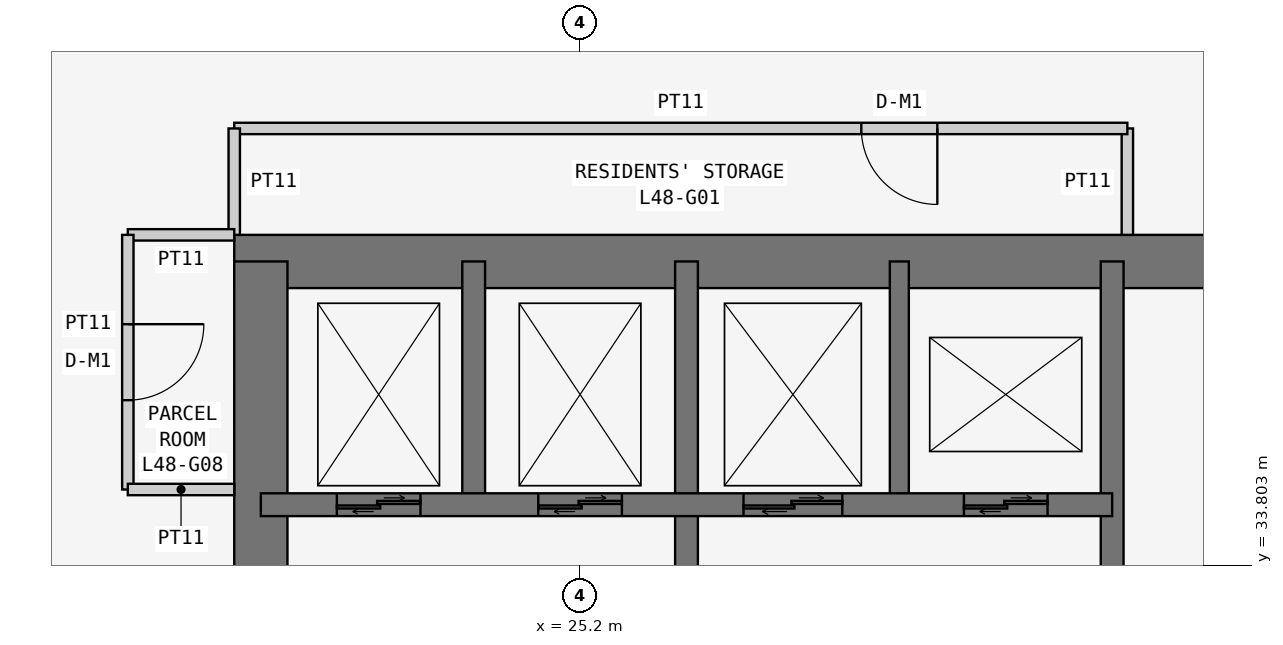
"""IFC4 building model, lengths in metres.
Left out: names, types, materials, properties, quantities, classifications, styles, units other than length and angle.
Written with IfcOpenShell. Run it as: python <this file> out.ifc"""

import sys

from ifc_helpers import new_model, si_unit, direction, frame, frame_2d, origin, place, context, subcontext, project, spatial, rectangle, extrude, element, fill, save


model = new_model("IFC4")
c1 = context("Model", 3, precision=1e-05, world=origin(), true_north=direction((0.0, 1.0)))
c2 = subcontext(c1, "Body", "Model", "MODEL_VIEW")
j1 = project(units=[si_unit("LENGTHUNIT", "METRE"), si_unit("PLANEANGLEUNIT", "RADIAN")], contexts=[c1])
p1 = place(None, origin())
s1 = spatial("IfcSite", under=j1, at=p1, CompositionType="ELEMENT")
p2 = place(p1, origin())
s2 = spatial("IfcBuilding", under=s1, at=p2, CompositionType="ELEMENT")
p3 = place(p2, frame((0.0, 0.0, 186.9)))
s3 = spatial("IfcBuildingStorey", under=s2, at=p3, CompositionType="ELEMENT", Elevation=186.9)
p4 = place(p3, frame((37.8, 37.8, 0.0), z_axis=(0.0, 0.0, 1.0), x_axis=(-1.0, 0.0, 0.0)))
e1 = element("IfcWall", 1, at=p4, inside=s3, PredefinedType="SHEAR", context=c2, shape_type="SweptSolid", body=[
    extrude(rectangle(XDim=17.15, YDim=0.7, at=frame_2d((8.575, 0.0))), origin(), (0.0, 0.0, 1.0), 3.6),
])
p5 = place(p3, frame((21.0, 37.8, 0.0), z_axis=(0.0, 0.0, 1.0), x_axis=(0.0, -1.0, 0.0)))
e2 = element("IfcWall", 2, at=p5, inside=s3, PredefinedType="SHEAR", context=c2, shape_type="SweptSolid", body=[
    extrude(rectangle(XDim=17.15, YDim=0.7, at=frame_2d((8.575, 0.0))), origin(), (0.0, 0.0, 1.0), 3.6),
])
p6 = place(p5, frame((5.4, 0.0, 0.0)))
e3 = element("IfcOpeningElement", 3, at=p6, cuts=e2, PredefinedType="OPENING", context=c2, shape_type="SweptSolid", body=[
    extrude(rectangle(XDim=1.2, YDim=2.1, at=frame_2d((0.6, 1.05))), frame((0.0, 0.36, 0.0), z_axis=(0.0, -1.0, 0.0), x_axis=(1.0, 0.0, 0.0)), (0.0, 0.0, 1.0), 0.72),
])
p7 = place(p3, frame((26.6, 21.0, 0.0), z_axis=(0.0, 0.0, 1.0), x_axis=(0.0, 1.0, 0.0)))
e4 = element("IfcWall", 4, at=p7, inside=s3, PredefinedType="SHEAR", context=c2, shape_type="SweptSolid", body=[
    extrude(rectangle(XDim=16.8, YDim=0.3, at=frame_2d((8.4, 0.0))), origin(), (0.0, 0.0, 1.0), 3.6),
])
p8 = place(p7, frame((10.4, 0.0, 0.0)))
e5 = element("IfcOpeningElement", 5, at=p8, cuts=e4, PredefinedType="OPENING", context=c2, shape_type="SweptSolid", body=[
    extrude(rectangle(XDim=1.2, YDim=2.1, at=frame_2d((0.6, 1.05))), frame((0.0, 0.16, 0.0), z_axis=(0.0, -1.0, 0.0), x_axis=(1.0, 0.0, 0.0)), (0.0, 0.0, 1.0), 0.32),
])
p9 = place(p3, frame((21.0, 34.6, 0.0), z_axis=(0.0, 0.0, 1.0), x_axis=(1.0, 0.0, 0.0)))
e6 = element("IfcWall", 6, at=p9, inside=s3, PredefinedType="SHEAR", context=c2, shape_type="SweptSolid", body=[
    extrude(rectangle(XDim=11.2, YDim=0.3, at=frame_2d((5.6, 0.0))), origin(), (0.0, 0.0, 1.0), 3.6),
])
p10 = place(p9, frame((9.25, 0.0, 0.0)))
e7 = element("IfcOpeningElement", 7, at=p10, cuts=e6, PredefinedType="OPENING", context=c2, shape_type="SweptSolid", body=[
    extrude(rectangle(XDim=1.1, YDim=2.1, at=frame_2d((0.55, 1.05))), frame((0.0, 0.16, 0.0), z_axis=(0.0, -1.0, 0.0), x_axis=(1.0, 0.0, 0.0)), (0.0, 0.0, 1.0), 0.32),
])
p11 = place(p9, frame((1.0, 0.0, 0.0)))
e8 = element("IfcOpeningElement", 8, at=p11, cuts=e6, PredefinedType="OPENING", context=c2, shape_type="SweptSolid", body=[
    extrude(rectangle(XDim=1.1, YDim=2.1, at=frame_2d((0.55, 1.05))), frame((0.0, 0.16, 0.0), z_axis=(0.0, -1.0, 0.0), x_axis=(1.0, 0.0, 0.0)), (0.0, 0.0, 1.0), 0.32),
])
p12 = place(p9, frame((3.65, 0.0, 0.0)))
e9 = element("IfcOpeningElement", 9, at=p12, cuts=e6, PredefinedType="OPENING", context=c2, shape_type="SweptSolid", body=[
    extrude(rectangle(XDim=1.1, YDim=2.1, at=frame_2d((0.55, 1.05))), frame((0.0, 0.16, 0.0), z_axis=(0.0, -1.0, 0.0), x_axis=(1.0, 0.0, 0.0)), (0.0, 0.0, 1.0), 0.32),
])
p13 = place(p9, frame((6.35, 0.0, 0.0)))
e10 = element("IfcOpeningElement", 10, at=p13, cuts=e6, PredefinedType="OPENING", context=c2, shape_type="SweptSolid", body=[
    extrude(rectangle(XDim=1.3, YDim=2.1, at=frame_2d((0.65, 1.05))), frame((0.0, 0.16, 0.0), z_axis=(0.0, -1.0, 0.0), x_axis=(1.0, 0.0, 0.0)), (0.0, 0.0, 1.0), 0.32),
])
p14 = place(p3, frame((23.8, 34.6, 0.0), z_axis=(0.0, 0.0, 1.0), x_axis=(0.0, 1.0, 0.0)))
e11 = element("IfcWall", 11, at=p14, inside=s3, PredefinedType="SHEAR", context=c2, shape_type="SweptSolid", body=[
    extrude(rectangle(XDim=3.2, YDim=0.3, at=frame_2d((1.6, 0.0))), origin(), (0.0, 0.0, 1.0), 3.6),
])
p15 = place(p3, frame((32.2, 29.25, 0.0), z_axis=(0.0, 0.0, 1.0), x_axis=(0.0, 1.0, 0.0)))
e12 = element("IfcWall", 12, at=p15, inside=s3, PredefinedType="SHEAR", context=c2, shape_type="SweptSolid", body=[
    extrude(rectangle(XDim=8.55, YDim=0.3, at=frame_2d((4.275, 0.0))), origin(), (0.0, 0.0, 1.0), 3.6),
])
p16 = place(p3, frame((29.4, 34.6, 0.0), z_axis=(0.0, 0.0, 1.0), x_axis=(0.0, 1.0, 0.0)))
e13 = element("IfcWall", 13, at=p16, inside=s3, PredefinedType="SHEAR", context=c2, shape_type="SweptSolid", body=[
    extrude(rectangle(XDim=3.2, YDim=0.25, at=frame_2d((1.6, 0.0))), origin(), (0.0, 0.0, 1.0), 3.6),
])
p17 = place(p3, frame((32.4, 38.15, 0.0), z_axis=(0.0, 0.0, 1.0), x_axis=(0.0, 1.0, 0.0)))
e14 = element("IfcWall", 14, at=p17, inside=s3, PredefinedType="PARTITIONING", context=c2, shape_type="SweptSolid", body=[
    extrude(rectangle(XDim=1.4, YDim=0.15, at=frame_2d((0.7, 0.0))), origin(), (0.0, 0.0, 1.0), 3.45),
])
p18 = place(p3, frame((32.4, 39.55, 0.0), z_axis=(0.0, 0.0, 1.0), x_axis=(-1.0, 0.0, 0.0)))
e15 = element("IfcWall", 15, at=p18, inside=s3, PredefinedType="PARTITIONING", context=c2, shape_type="SweptSolid", body=[
    extrude(rectangle(XDim=11.75, YDim=0.15, at=frame_2d((5.875, 0.0))), origin(), (0.0, 0.0, 1.0), 3.45),
])
p19 = place(p18, frame((2.5, 0.0, 0.0)))
e16 = element("IfcOpeningElement", 16, at=p19, cuts=e15, PredefinedType="OPENING", context=c2, shape_type="SweptSolid", body=[
    extrude(rectangle(XDim=1.0, YDim=2.1, at=frame_2d((0.5, 1.05))), frame((0.0, 0.085, 0.0), z_axis=(0.0, -1.0, 0.0), x_axis=(1.0, 0.0, 0.0)), (0.0, 0.0, 1.0), 0.17),
])
p20 = place(p3, frame((20.65, 39.55, 0.0), z_axis=(0.0, 0.0, 1.0), x_axis=(0.0, -1.0, 0.0)))
e17 = element("IfcWall", 17, at=p20, inside=s3, PredefinedType="PARTITIONING", context=c2, shape_type="SweptSolid", body=[
    extrude(rectangle(XDim=1.4, YDim=0.15, at=frame_2d((0.7, 0.0))), origin(), (0.0, 0.0, 1.0), 3.45),
])
p21 = place(p3, frame((20.65, 38.15, 0.0), z_axis=(0.0, 0.0, 1.0), x_axis=(-1.0, 0.0, 0.0)))
e18 = element("IfcWall", 18, at=p21, inside=s3, PredefinedType="PARTITIONING", context=c2, shape_type="SweptSolid", body=[
    extrude(rectangle(XDim=1.4, YDim=0.15, at=frame_2d((0.7, 0.0))), origin(), (0.0, 0.0, 1.0), 3.45),
])
p22 = place(p3, frame((19.25, 38.15, 0.0), z_axis=(0.0, 0.0, 1.0), x_axis=(0.0, -1.0, 0.0)))
e19 = element("IfcWall", 19, at=p22, inside=s3, PredefinedType="PARTITIONING", context=c2, shape_type="SweptSolid", body=[
    extrude(rectangle(XDim=3.35, YDim=0.15, at=frame_2d((1.675, 0.0))), origin(), (0.0, 0.0, 1.0), 3.45),
])
p23 = place(p22, frame((1.175, 0.0, 0.0)))
e20 = element("IfcOpeningElement", 20, at=p23, cuts=e19, PredefinedType="OPENING", context=c2, shape_type="SweptSolid", body=[
    extrude(rectangle(XDim=1.0, YDim=2.1, at=frame_2d((0.5, 1.05))), frame((0.0, 0.085, 0.0), z_axis=(0.0, -1.0, 0.0), x_axis=(1.0, 0.0, 0.0)), (0.0, 0.0, 1.0), 0.17),
])
p24 = place(p3, frame((19.25, 34.8, 0.0), z_axis=(0.0, 0.0, 1.0), x_axis=(1.0, 0.0, 0.0)))
e21 = element("IfcWall", 21, at=p24, inside=s3, PredefinedType="PARTITIONING", context=c2, shape_type="SweptSolid", body=[
    extrude(rectangle(XDim=1.4, YDim=0.15, at=frame_2d((0.7, 0.0))), origin(), (0.0, 0.0, 1.0), 3.45),
])
p25 = place(p19, origin())
e22 = element("IfcDoor", 22, at=p25, inside=s3, OperationType="SINGLE_SWING_LEFT", PredefinedType="DOOR", context=c2, shape_type="SweptSolid", body=[
    extrude(rectangle(XDim=1.0, YDim=2.1, at=frame_2d((0.5, 1.05))), frame((0.0, 0.025, 0.0), z_axis=(0.0, -1.0, 0.0), x_axis=(1.0, 0.0, 0.0)), (0.0, 0.0, 1.0), 0.05),
])
fill(e16, e22)
p26 = place(p23, origin())
e23 = element("IfcDoor", 23, at=p26, inside=s3, OperationType="SINGLE_SWING_LEFT", PredefinedType="DOOR", context=c2, shape_type="SweptSolid", body=[
    extrude(rectangle(XDim=1.0, YDim=2.1, at=frame_2d((0.5, 1.05))), frame((0.0, 0.025, 0.0), z_axis=(0.0, -1.0, 0.0), x_axis=(1.0, 0.0, 0.0)), (0.0, 0.0, 1.0), 0.05),
])
fill(e20, e23)
p27 = place(p10, origin())
e24 = element("IfcDoor", 24, at=p27, inside=s3, OperationType="DOUBLE_DOOR_SLIDING", PredefinedType="DOOR", context=c2, shape_type="SweptSolid", body=[
    extrude(rectangle(XDim=1.1, YDim=2.1, at=frame_2d((0.55, 1.05))), frame((0.0, 0.025, 0.0), z_axis=(0.0, -1.0, 0.0), x_axis=(1.0, 0.0, 0.0)), (0.0, 0.0, 1.0), 0.05),
])
fill(e7, e24)
p28 = place(p11, origin())
e25 = element("IfcDoor", 25, at=p28, inside=s3, OperationType="DOUBLE_DOOR_SLIDING", PredefinedType="DOOR", context=c2, shape_type="SweptSolid", body=[
    extrude(rectangle(XDim=1.1, YDim=2.1, at=frame_2d((0.55, 1.05))), frame((0.0, 0.025, 0.0), z_axis=(0.0, -1.0, 0.0), x_axis=(1.0, 0.0, 0.0)), (0.0, 0.0, 1.0), 0.05),
])
fill(e8, e25)
p29 = place(p12, origin())
e26 = element("IfcDoor", 26, at=p29, inside=s3, OperationType="DOUBLE_DOOR_SLIDING", PredefinedType="DOOR", context=c2, shape_type="SweptSolid", body=[
    extrude(rectangle(XDim=1.1, YDim=2.1, at=frame_2d((0.55, 1.05))), frame((0.0, 0.025, 0.0), z_axis=(0.0, -1.0, 0.0), x_axis=(1.0, 0.0, 0.0)), (0.0, 0.0, 1.0), 0.05),
])
fill(e9, e26)
p30 = place(p13, origin())
e27 = element("IfcDoor", 27, at=p30, inside=s3, OperationType="DOUBLE_DOOR_SLIDING", PredefinedType="DOOR", context=c2, shape_type="SweptSolid", body=[
    extrude(rectangle(XDim=1.3, YDim=2.1, at=frame_2d((0.65, 1.05))), frame((0.0, 0.025, 0.0), z_axis=(0.0, -1.0, 0.0), x_axis=(1.0, 0.0, 0.0)), (0.0, 0.0, 1.0), 0.05),
])
fill(e10, e27)
save(model, sys.argv[1])
